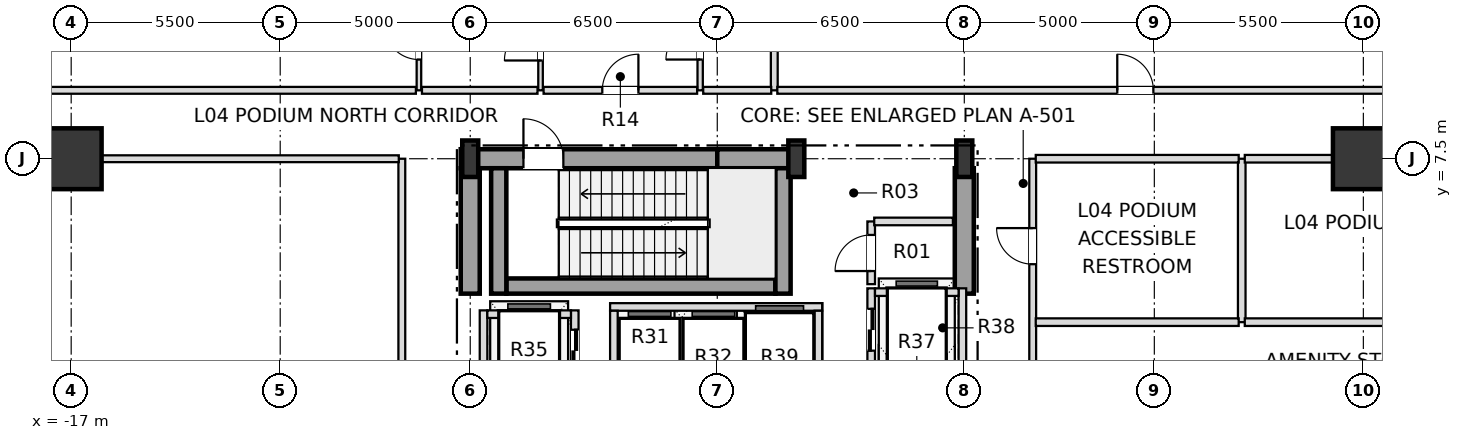
"""IFC4 building model, lengths in metres.
Left out: names, types, materials, properties, quantities, classifications, styles, units other than length and angle.
Written with IfcOpenShell. Run it as: python <this file> out.ifc"""

import sys

from ifc_helpers import new_model, si_unit, direction, frame, frame_2d, origin, origin_2d, place, context, subcontext, project, spatial, rectangle, i_section, extrude, element, fill, save


model = new_model("IFC4")
c1 = context("Model", 3, precision=1e-05, world=origin(), true_north=direction((0.0, 1.0)))
c2 = subcontext(c1, "Body", "Model", "MODEL_VIEW")
j1 = project(units=[si_unit("LENGTHUNIT", "METRE"), si_unit("PLANEANGLEUNIT", "RADIAN")], contexts=[c1])
p1 = place(None, origin())
s1 = spatial("IfcSite", under=j1, at=p1, CompositionType="ELEMENT")
p2 = place(p1, origin())
s2 = spatial("IfcBuilding", under=s1, at=p2, CompositionType="ELEMENT")
p3 = place(p2, frame((0.0, 0.0, 22.2)))
s3 = spatial("IfcBuildingStorey", under=s2, at=p3, CompositionType="ELEMENT", Elevation=22.2)
for number, where, z_axis, x_axis in (
    (1, (-6.5, 7.5, 0.0), (0.0, 0.0, 1.0), (1.0, 0.0, 0.0)),
    (2, (2.08, 7.5, 0.0), (0.0, 0.0, 1.0), (1.0, 0.0, 0.0)),
    (3, (6.5, 7.5, 0.0), (0.0, 0.0, 1.0), (1.0, 0.0, 0.0)),
):
    element("IfcColumn", number, at=place(p3, frame(where, z_axis=z_axis, x_axis=x_axis)), inside=s3, PredefinedType="COLUMN", context=c2, shape_type="SweptSolid", body=[
        extrude(i_section(OverallWidth=0.42, OverallDepth=0.96, WebThickness=0.022, FlangeThickness=0.034, at=origin_2d()), origin(), (0.0, 0.0, 1.0), 5.4),
    ])
for number, where, z_axis, x_axis in (
    (4, (17.0, 7.5, 0.0), (0.0, 0.0, 1.0), (1.0, 0.0, 0.0)),
    (5, (-17.0, 7.5, 0.0), (0.0, 0.0, 1.0), (1.0, 0.0, 0.0)),
):
    element("IfcColumn", number, at=place(p3, frame(where, z_axis=z_axis, x_axis=x_axis)), inside=s3, PredefinedType="USERDEFINED", context=c2, shape_type="SweptSolid", body=[
        extrude(rectangle(XDim=1.6, YDim=1.6, at=origin_2d()), origin(), (0.0, 0.0, 1.0), 5.4),
    ])
p4 = place(p3, frame((-6.75, 7.5, 0.0), z_axis=(0.0, 0.0, 1.0), x_axis=(1.0, 0.0, 0.0)))
e6 = element("IfcWall", 6, at=p4, inside=s3, PredefinedType="SHEAR", context=c2, shape_type="SweptSolid", body=[
    extrude(rectangle(XDim=6.75, YDim=0.5, at=frame_2d((3.375, 0.0))), origin(), (0.0, 0.0, 1.0), 5.0),
])
p5 = place(p4, frame((1.65, 0.0, 0.0)))
e7 = element("IfcOpeningElement", 7, at=p5, cuts=e6, PredefinedType="OPENING", context=c2, shape_type="SweptSolid", body=[
    extrude(rectangle(XDim=1.05, YDim=2.15, at=frame_2d((0.525, 1.075))), frame((0.0, 0.26, 0.0), z_axis=(0.0, -1.0, 0.0), x_axis=(1.0, 0.0, 0.0)), (0.0, 0.0, 1.0), 0.52),
])
p6 = place(p3, frame((0.0, 7.5, 0.0), z_axis=(0.0, 0.0, 1.0), x_axis=(1.0, 0.0, 0.0)))
e8 = element("IfcWall", 8, at=p6, inside=s3, PredefinedType="SHEAR", context=c2, shape_type="SweptSolid", body=[
    extrude(rectangle(XDim=2.08, YDim=0.5, at=frame_2d((1.04, 0.0))), origin(), (0.0, 0.0, 1.0), 5.0),
])
for number, where, z_axis, x_axis in (
    (9, (-6.5, 3.95, 0.0), (0.0, 0.0, 1.0), (0.0, 1.0, 0.0)),
    (10, (6.5, 3.95, 0.0), (0.0, 0.0, 1.0), (0.0, 1.0, 0.0)),
):
    element("IfcWall", number, at=place(p3, frame(where, z_axis=z_axis, x_axis=x_axis)), inside=s3, PredefinedType="SHEAR", context=c2, shape_type="SweptSolid", body=[
        extrude(rectangle(XDim=3.3, YDim=0.5, at=frame_2d((1.65, 0.0))), origin(), (0.0, 0.0, 1.0), 5.0),
    ])
p7 = place(p3, frame((-5.55, 4.15, 0.0), z_axis=(0.0, 0.0, 1.0), x_axis=(1.0, 0.0, 0.0)))
e11 = element("IfcWall", 11, at=p7, inside=s3, PredefinedType="SHEAR", context=c2, shape_type="SweptSolid", body=[
    extrude(rectangle(XDim=7.08, YDim=0.4, at=frame_2d((3.54, 0.0))), origin(), (0.0, 0.0, 1.0), 5.0),
])
for number, where, z_axis, x_axis in (
    (12, (1.73, 3.95, 0.0), (0.0, 0.0, 1.0), (0.0, 1.0, 0.0)),
    (13, (-5.75, 3.95, 0.0), (0.0, 0.0, 1.0), (0.0, 1.0, 0.0)),
):
    element("IfcWall", number, at=place(p3, frame(where, z_axis=z_axis, x_axis=x_axis)), inside=s3, PredefinedType="SHEAR", context=c2, shape_type="SweptSolid", body=[
        extrude(rectangle(XDim=3.3, YDim=0.4, at=frame_2d((1.65, 0.0))), origin(), (0.0, 0.0, 1.0), 5.0),
    ])
p8 = place(p3, frame((-3.75, -3.51, 0.0), z_axis=(0.0, 0.0, 1.0), x_axis=(0.0, 1.0, 0.0)))
e14 = element("IfcWall", 14, at=p8, inside=s3, PredefinedType="SOLIDWALL", context=c2, shape_type="SweptSolid", body=[
    extrude(rectangle(XDim=7.02, YDim=0.2, at=frame_2d((3.51, 0.0))), origin(), (0.0, 0.0, 1.0), 5.0),
])
p9 = place(p8, frame((0.51, 0.0, 0.0)))
e15 = element("IfcOpeningElement", 15, at=p9, cuts=e14, PredefinedType="OPENING", context=c2, shape_type="SweptSolid", body=[
    extrude(rectangle(XDim=1.1, YDim=2.15, at=frame_2d((0.55, 1.075))), frame((0.0, 0.11, 0.0), z_axis=(0.0, -1.0, 0.0), x_axis=(1.0, 0.0, 0.0)), (0.0, 0.0, 1.0), 0.22),
])
p10 = place(p8, frame((2.96, 0.0, 0.0)))
e16 = element("IfcOpeningElement", 16, at=p10, cuts=e14, PredefinedType="OPENING", context=c2, shape_type="SweptSolid", body=[
    extrude(rectangle(XDim=1.1, YDim=2.15, at=frame_2d((0.55, 1.075))), frame((0.0, 0.11, 0.0), z_axis=(0.0, -1.0, 0.0), x_axis=(1.0, 0.0, 0.0)), (0.0, 0.0, 1.0), 0.22),
])
p11 = place(p8, frame((5.41, 0.0, 0.0)))
e17 = element("IfcOpeningElement", 17, at=p11, cuts=e14, PredefinedType="OPENING", context=c2, shape_type="SweptSolid", body=[
    extrude(rectangle(XDim=1.1, YDim=2.15, at=frame_2d((0.55, 1.075))), frame((0.0, 0.11, 0.0), z_axis=(0.0, -1.0, 0.0), x_axis=(1.0, 0.0, 0.0)), (0.0, 0.0, 1.0), 0.22),
])
p12 = place(p3, frame((-6.15, -3.51, 0.0), z_axis=(0.0, 0.0, 1.0), x_axis=(0.0, 1.0, 0.0)))
e18 = element("IfcWall", 18, at=p12, inside=s3, PredefinedType="SOLIDWALL", context=c2, shape_type="SweptSolid", body=[
    extrude(rectangle(XDim=7.02, YDim=0.2, at=frame_2d((3.51, 0.0))), origin(), (0.0, 0.0, 1.0), 5.0),
])
p13 = place(p3, frame((-6.05, 3.41, 0.0), z_axis=(0.0, 0.0, 1.0), x_axis=(1.0, 0.0, 0.0)))
e19 = element("IfcWall", 19, at=p13, inside=s3, PredefinedType="SOLIDWALL", context=c2, shape_type="SweptSolid", body=[
    extrude(rectangle(XDim=2.2, YDim=0.2, at=frame_2d((1.1, 0.0))), origin(), (0.0, 0.0, 1.0), 5.0),
])
p14 = place(p3, frame((4.05, -1.49, 0.0), z_axis=(0.0, 0.0, 1.0), x_axis=(0.0, 1.0, 0.0)))
e20 = element("IfcWall", 20, at=p14, inside=s3, PredefinedType="SOLIDWALL", context=c2, shape_type="SweptSolid", body=[
    extrude(rectangle(XDim=5.58, YDim=0.2, at=frame_2d((2.79, 0.0))), origin(), (0.0, 0.0, 1.0), 5.0),
])
p15 = place(p14, frame((0.54, 0.0, 0.0)))
e21 = element("IfcOpeningElement", 21, at=p15, cuts=e20, PredefinedType="OPENING", context=c2, shape_type="SweptSolid", body=[
    extrude(rectangle(XDim=1.1, YDim=2.15, at=frame_2d((0.55, 1.075))), frame((0.0, 0.11, 0.0), z_axis=(0.0, -1.0, 0.0), x_axis=(1.0, 0.0, 0.0)), (0.0, 0.0, 1.0), 0.22),
])
p16 = place(p14, frame((2.24, 0.0, 0.0)))
e22 = element("IfcOpeningElement", 22, at=p16, cuts=e20, PredefinedType="OPENING", context=c2, shape_type="SweptSolid", body=[
    extrude(rectangle(XDim=1.1, YDim=2.15, at=frame_2d((0.55, 1.075))), frame((0.0, 0.11, 0.0), z_axis=(0.0, -1.0, 0.0), x_axis=(1.0, 0.0, 0.0)), (0.0, 0.0, 1.0), 0.22),
])
p17 = place(p14, frame((3.94, 0.0, 0.0)))
e23 = element("IfcOpeningElement", 23, at=p17, cuts=e20, PredefinedType="OPENING", context=c2, shape_type="SweptSolid", body=[
    extrude(rectangle(XDim=1.1, YDim=2.15, at=frame_2d((0.55, 1.075))), frame((0.0, 0.11, 0.0), z_axis=(0.0, -1.0, 0.0), x_axis=(1.0, 0.0, 0.0)), (0.0, 0.0, 1.0), 0.22),
])
p18 = place(p3, frame((6.45, -1.49, 0.0), z_axis=(0.0, 0.0, 1.0), x_axis=(0.0, 1.0, 0.0)))
e24 = element("IfcWall", 24, at=p18, inside=s3, PredefinedType="SOLIDWALL", context=c2, shape_type="SweptSolid", body=[
    extrude(rectangle(XDim=5.58, YDim=0.2, at=frame_2d((2.79, 0.0))), origin(), (0.0, 0.0, 1.0), 4.436),
])
p19 = place(p3, frame((4.15, 3.99, 0.0), z_axis=(0.0, 0.0, 1.0), x_axis=(1.0, 0.0, 0.0)))
e25 = element("IfcWall", 25, at=p19, inside=s3, PredefinedType="SOLIDWALL", context=c2, shape_type="SweptSolid", body=[
    extrude(rectangle(XDim=2.2, YDim=0.2, at=frame_2d((1.1, 0.0))), origin(), (0.0, 0.0, 1.0), 5.0),
])
p20 = place(p3, frame((-2.82, 3.6, 0.0), z_axis=(0.0, 0.0, 1.0), x_axis=(1.0, 0.0, 0.0)))
e26 = element("IfcWall", 26, at=p20, inside=s3, PredefinedType="SOLIDWALL", context=c2, shape_type="SweptSolid", body=[
    extrude(rectangle(XDim=5.58, YDim=0.2, at=frame_2d((2.79, 0.0))), origin(), (0.0, 0.0, 1.0), 5.0),
])
for number, where, z_axis, x_axis in (
    (27, (-2.72, 1.0, 0.0), (0.0, 0.0, 1.0), (0.0, 1.0, 0.0)),
    (28, (2.66, 1.0, 0.0), (0.0, 0.0, 1.0), (0.0, 1.0, 0.0)),
):
    element("IfcWall", number, at=place(p3, frame(where, z_axis=z_axis, x_axis=x_axis)), inside=s3, PredefinedType="SOLIDWALL", context=c2, shape_type="SweptSolid", body=[
        extrude(rectangle(XDim=2.5, YDim=0.2, at=frame_2d((1.25, 0.0))), origin(), (0.0, 0.0, 1.0), 5.0),
    ])
p21 = place(p3, frame((-8.3, -7.5, 0.0), z_axis=(0.0, 0.0, 1.0), x_axis=(0.0, 1.0, 0.0)))
e29 = element("IfcWall", 29, at=p21, inside=s3, PredefinedType="PARTITIONING", context=c2, shape_type="SweptSolid", body=[
    extrude(rectangle(XDim=15.0, YDim=0.18, at=frame_2d((7.5, 0.0))), origin(), (0.0, 0.0, 1.0), 5.0),
])
p22 = place(p21, frame((7.025, 0.0, 0.0)))
e30 = element("IfcOpeningElement", 30, at=p22, cuts=e29, PredefinedType="OPENING", context=c2, shape_type="SweptSolid", body=[
    extrude(rectangle(XDim=0.95, YDim=2.15, at=frame_2d((0.475, 1.075))), frame((0.0, 0.1, 0.0), z_axis=(0.0, -1.0, 0.0), x_axis=(1.0, 0.0, 0.0)), (0.0, 0.0, 1.0), 0.2),
])
p23 = place(p3, frame((-7.85, 9.3, 0.0), z_axis=(0.0, 0.0, 1.0), x_axis=(0.0, 1.0, 0.0)))
e31 = element("IfcWall", 31, at=p23, inside=s3, PredefinedType="PARTITIONING", context=c2, shape_type="SweptSolid", body=[
    extrude(rectangle(XDim=7.395, YDim=0.12, at=frame_2d((3.698, 0.0))), origin(), (0.0, 0.0, 1.0), 4.436),
])
p24 = place(p23, frame((0.81, 0.0, 0.0)))
e32 = element("IfcOpeningElement", 32, at=p24, cuts=e31, PredefinedType="OPENING", context=c2, shape_type="SweptSolid", body=[
    extrude(rectangle(XDim=0.9, YDim=2.1, at=frame_2d((0.45, 1.05))), frame((0.0, 0.07, 0.0), z_axis=(0.0, -1.0, 0.0), x_axis=(1.0, 0.0, 0.0)), (0.0, 0.0, 1.0), 0.14),
])
p25 = place(p23, frame((4.51, 0.0, 0.0)))
e33 = element("IfcOpeningElement", 33, at=p25, cuts=e31, PredefinedType="OPENING", context=c2, shape_type="SweptSolid", body=[
    extrude(rectangle(XDim=0.9, YDim=2.1, at=frame_2d((0.45, 1.05))), frame((0.0, 0.07, 0.0), z_axis=(0.0, -1.0, 0.0), x_axis=(1.0, 0.0, 0.0)), (0.0, 0.0, 1.0), 0.14),
])
p26 = place(p3, frame((-4.65, 9.3, 0.0), z_axis=(0.0, 0.0, 1.0), x_axis=(0.0, 1.0, 0.0)))
e34 = element("IfcWall", 34, at=p26, inside=s3, PredefinedType="PARTITIONING", context=c2, shape_type="SweptSolid", body=[
    extrude(rectangle(XDim=2.52, YDim=0.12, at=frame_2d((1.26, 0.0))), origin(), (0.0, 0.0, 1.0), 5.0),
])
p27 = place(p26, frame((0.785, 0.0, 0.0)))
e35 = element("IfcOpeningElement", 35, at=p27, cuts=e34, PredefinedType="OPENING", context=c2, shape_type="SweptSolid", body=[
    extrude(rectangle(XDim=0.95, YDim=2.1, at=frame_2d((0.475, 1.05))), frame((0.0, 0.07, 0.0), z_axis=(0.0, -1.0, 0.0), x_axis=(1.0, 0.0, 0.0)), (0.0, 0.0, 1.0), 0.14),
])
p28 = place(p3, frame((-0.45, 9.3, 0.0), z_axis=(0.0, 0.0, 1.0), x_axis=(0.0, 1.0, 0.0)))
e36 = element("IfcWall", 36, at=p28, inside=s3, PredefinedType="PARTITIONING", context=c2, shape_type="SweptSolid", body=[
    extrude(rectangle(XDim=2.52, YDim=0.14, at=frame_2d((1.26, 0.0))), origin(), (0.0, 0.0, 1.0), 5.0),
])
p29 = place(p28, frame((0.81, 0.0, 0.0)))
e37 = element("IfcOpeningElement", 37, at=p29, cuts=e36, PredefinedType="OPENING", context=c2, shape_type="SweptSolid", body=[
    extrude(rectangle(XDim=0.9, YDim=2.1, at=frame_2d((0.45, 1.05))), frame((0.0, 0.08, 0.0), z_axis=(0.0, -1.0, 0.0), x_axis=(1.0, 0.0, 0.0)), (0.0, 0.0, 1.0), 0.16),
])
p30 = place(p3, frame((1.5, 9.3, 0.0), z_axis=(0.0, 0.0, 1.0), x_axis=(0.0, 1.0, 0.0)))
e38 = element("IfcWall", 38, at=p30, inside=s3, PredefinedType="PARTITIONING", context=c2, shape_type="SweptSolid", body=[
    extrude(rectangle(XDim=7.455, YDim=0.18, at=frame_2d((3.728, 0.0))), origin(), (0.0, 0.0, 1.0), 4.568),
])
p31 = place(p3, frame((4.05, 4.2, 0.0), z_axis=(0.0, 0.0, 1.0), x_axis=(0.0, 1.0, 0.0)))
e39 = element("IfcWall", 39, at=p31, inside=s3, PredefinedType="SOLIDWALL", context=c2, shape_type="SweptSolid", body=[
    extrude(rectangle(XDim=1.65, YDim=0.2, at=frame_2d((0.825, 0.0))), origin(), (0.0, 0.0, 1.0), 5.0),
])
p32 = place(p31, frame((0.345, 0.0, 0.0)))
e40 = element("IfcOpeningElement", 40, at=p32, cuts=e39, PredefinedType="OPENING", context=c2, shape_type="SweptSolid", body=[
    extrude(rectangle(XDim=0.95, YDim=2.15, at=frame_2d((0.475, 1.075))), frame((0.0, 0.11, 0.0), z_axis=(0.0, -1.0, 0.0), x_axis=(1.0, 0.0, 0.0)), (0.0, 0.0, 1.0), 0.22),
])
p33 = place(p3, frame((8.3, -7.5, 0.0), z_axis=(0.0, 0.0, 1.0), x_axis=(0.0, 1.0, 0.0)))
e41 = element("IfcWall", 41, at=p33, inside=s3, PredefinedType="PARTITIONING", context=c2, shape_type="SweptSolid", body=[
    extrude(rectangle(XDim=15.0, YDim=0.18, at=frame_2d((7.5, 0.0))), origin(), (0.0, 0.0, 1.0), 5.0),
])
p34 = place(p33, frame((5.025, 0.0, 0.0)))
e42 = element("IfcOpeningElement", 42, at=p34, cuts=e41, PredefinedType="OPENING", context=c2, shape_type="SweptSolid", body=[
    extrude(rectangle(XDim=0.95, YDim=2.15, at=frame_2d((0.475, 1.075))), frame((0.0, 0.1, 0.0), z_axis=(0.0, -1.0, 0.0), x_axis=(1.0, 0.0, 0.0)), (0.0, 0.0, 1.0), 0.2),
])
p35 = place(p33, frame((12.225, 0.0, 0.0)))
e43 = element("IfcOpeningElement", 43, at=p35, cuts=e41, PredefinedType="OPENING", context=c2, shape_type="SweptSolid", body=[
    extrude(rectangle(XDim=0.95, YDim=2.15, at=frame_2d((0.475, 1.075))), frame((0.0, 0.1, 0.0), z_axis=(0.0, -1.0, 0.0), x_axis=(1.0, 0.0, 0.0)), (0.0, 0.0, 1.0), 0.2),
])
p36 = place(p3, frame((13.8, 3.2, 0.0), z_axis=(0.0, 0.0, 1.0), x_axis=(0.0, 1.0, 0.0)))
e44 = element("IfcWall", 44, at=p36, inside=s3, PredefinedType="SOLIDWALL", context=c2, shape_type="SweptSolid", body=[
    extrude(rectangle(XDim=4.3, YDim=0.2, at=frame_2d((2.15, 0.0))), origin(), (0.0, 0.0, 1.0), 5.0),
])
p37 = place(p3, frame((8.38, 3.2, 0.0), z_axis=(0.0, 0.0, 1.0), x_axis=(1.0, 0.0, 0.0)))
e45 = element("IfcWall", 45, at=p37, inside=s3, PredefinedType="SOLIDWALL", context=c2, shape_type="SweptSolid", body=[
    extrude(rectangle(XDim=5.34, YDim=0.2, at=frame_2d((2.67, 0.0))), origin(), (0.0, 0.0, 1.0), 4.568),
])
p38 = place(p3, frame((13.88, 3.2, 0.0), z_axis=(0.0, 0.0, 1.0), x_axis=(1.0, 0.0, 0.0)))
e46 = element("IfcWall", 46, at=p38, inside=s3, PredefinedType="SOLIDWALL", context=c2, shape_type="SweptSolid", body=[
    extrude(rectangle(XDim=8.815, YDim=0.2, at=frame_2d((4.408, 0.0))), origin(), (0.0, 0.0, 1.0), 4.356),
])
p39 = place(p38, frame((3.645, 0.0, 0.0)))
e47 = element("IfcOpeningElement", 47, at=p39, cuts=e46, PredefinedType="OPENING", context=c2, shape_type="SweptSolid", body=[
    extrude(rectangle(XDim=0.95, YDim=2.15, at=frame_2d((0.475, 1.075))), frame((0.0, 0.11, 0.0), z_axis=(0.0, -1.0, 0.0), x_axis=(1.0, 0.0, 0.0)), (0.0, 0.0, 1.0), 0.22),
])
p40 = place(p3, frame((4.13, 5.85, 0.0), z_axis=(0.0, 0.0, 1.0), x_axis=(1.0, 0.0, 0.0)))
e48 = element("IfcWall", 48, at=p40, inside=s3, PredefinedType="SOLIDWALL", context=c2, shape_type="SweptSolid", body=[
    extrude(rectangle(XDim=2.07, YDim=0.2, at=frame_2d((1.035, 0.0))), origin(), (0.0, 0.0, 1.0), 5.0),
])
p41 = place(p3, frame((-22.695, 7.5, 0.0), z_axis=(0.0, 0.0, 1.0), x_axis=(1.0, 0.0, 0.0)))
e49 = element("IfcWall", 49, at=p41, inside=s3, PredefinedType="PARTITIONING", context=c2, shape_type="SweptSolid", body=[
    extrude(rectangle(XDim=14.315, YDim=0.18, at=frame_2d((7.158, 0.0))), origin(), (0.0, 0.0, 1.0), 4.356),
])
p42 = place(p3, frame((8.38, 7.5, 0.0), z_axis=(0.0, 0.0, 1.0), x_axis=(1.0, 0.0, 0.0)))
e50 = element("IfcWall", 50, at=p42, inside=s3, PredefinedType="SOLIDWALL", context=c2, shape_type="SweptSolid", body=[
    extrude(rectangle(XDim=5.34, YDim=0.2, at=frame_2d((2.67, 0.0))), origin(), (0.0, 0.0, 1.0), 4.436),
])
p43 = place(p3, frame((13.88, 7.5, 0.0), z_axis=(0.0, 0.0, 1.0), x_axis=(1.0, 0.0, 0.0)))
e51 = element("IfcWall", 51, at=p43, inside=s3, PredefinedType="SOLIDWALL", context=c2, shape_type="SweptSolid", body=[
    extrude(rectangle(XDim=8.815, YDim=0.2, at=frame_2d((4.408, 0.0))), origin(), (0.0, 0.0, 1.0), 4.356),
])
p44 = place(p3, frame((-22.695, 9.3, 0.0), z_axis=(0.0, 0.0, 1.0), x_axis=(1.0, 0.0, 0.0)))
e52 = element("IfcWall", 52, at=p44, inside=s3, PredefinedType="PARTITIONING", context=c2, shape_type="SweptSolid", body=[
    extrude(rectangle(XDim=14.765, YDim=0.18, at=frame_2d((7.383, 0.0))), origin(), (0.0, 0.0, 1.0), 4.356),
])
p45 = place(p3, frame((-7.77, 9.3, 0.0), z_axis=(0.0, 0.0, 1.0), x_axis=(1.0, 0.0, 0.0)))
e53 = element("IfcWall", 53, at=p45, inside=s3, PredefinedType="PARTITIONING", context=c2, shape_type="SweptSolid", body=[
    extrude(rectangle(XDim=3.04, YDim=0.18, at=frame_2d((1.52, 0.0))), origin(), (0.0, 0.0, 1.0), 4.436),
])
p46 = place(p3, frame((-4.57, 9.3, 0.0), z_axis=(0.0, 0.0, 1.0), x_axis=(1.0, 0.0, 0.0)))
e54 = element("IfcWall", 54, at=p46, inside=s3, PredefinedType="PARTITIONING", context=c2, shape_type="SweptSolid", body=[
    extrude(rectangle(XDim=4.04, YDim=0.18, at=frame_2d((2.02, 0.0))), origin(), (0.0, 0.0, 1.0), 5.0),
])
p47 = place(p46, frame((1.545, 0.0, 0.0)))
e55 = element("IfcOpeningElement", 55, at=p47, cuts=e54, PredefinedType="OPENING", context=c2, shape_type="SweptSolid", body=[
    extrude(rectangle(XDim=0.95, YDim=2.15, at=frame_2d((0.475, 1.075))), frame((0.0, 0.1, 0.0), z_axis=(0.0, -1.0, 0.0), x_axis=(1.0, 0.0, 0.0)), (0.0, 0.0, 1.0), 0.2),
])
p48 = place(p3, frame((-0.37, 9.3, 0.0), z_axis=(0.0, 0.0, 1.0), x_axis=(1.0, 0.0, 0.0)))
e56 = element("IfcWall", 56, at=p48, inside=s3, PredefinedType="PARTITIONING", context=c2, shape_type="SweptSolid", body=[
    extrude(rectangle(XDim=1.79, YDim=0.18, at=frame_2d((0.895, 0.0))), origin(), (0.0, 0.0, 1.0), 5.0),
])
p49 = place(p3, frame((1.58, 9.3, 0.0), z_axis=(0.0, 0.0, 1.0), x_axis=(1.0, 0.0, 0.0)))
e57 = element("IfcWall", 57, at=p49, inside=s3, PredefinedType="PARTITIONING", context=c2, shape_type="SweptSolid", body=[
    extrude(rectangle(XDim=21.115, YDim=0.18, at=frame_2d((10.558, 0.0))), origin(), (0.0, 0.0, 1.0), 4.356),
])
p50 = place(p49, frame((8.945, 0.0, 0.0)))
e58 = element("IfcOpeningElement", 58, at=p50, cuts=e57, PredefinedType="OPENING", context=c2, shape_type="SweptSolid", body=[
    extrude(rectangle(XDim=0.95, YDim=2.15, at=frame_2d((0.475, 1.075))), frame((0.0, 0.1, 0.0), z_axis=(0.0, -1.0, 0.0), x_axis=(1.0, 0.0, 0.0)), (0.0, 0.0, 1.0), 0.2),
])
p51 = place(p5, origin())
e59 = element("IfcDoor", 59, at=p51, inside=s3, OperationType="SINGLE_SWING_LEFT", PredefinedType="DOOR", context=c2, shape_type="SweptSolid", body=[
    extrude(rectangle(XDim=1.05, YDim=2.15, at=frame_2d((0.525, 1.075))), frame((0.0, 0.025, 0.0), z_axis=(0.0, -1.0, 0.0), x_axis=(1.0, 0.0, 0.0)), (0.0, 0.0, 1.0), 0.05),
])
fill(e7, e59)
p52 = place(p11, origin())
e60 = element("IfcDoor", 60, at=p52, inside=s3, OperationType="DOUBLE_DOOR_SLIDING", PredefinedType="DOOR", context=c2, shape_type="SweptSolid", body=[
    extrude(rectangle(XDim=1.1, YDim=2.15, at=frame_2d((0.55, 1.075))), frame((0.0, 0.025, 0.0), z_axis=(0.0, -1.0, 0.0), x_axis=(1.0, 0.0, 0.0)), (0.0, 0.0, 1.0), 0.05),
])
fill(e17, e60)
p53 = place(p17, origin())
e61 = element("IfcDoor", 61, at=p53, inside=s3, OperationType="DOUBLE_DOOR_SLIDING", PredefinedType="DOOR", context=c2, shape_type="SweptSolid", body=[
    extrude(rectangle(XDim=1.1, YDim=2.15, at=frame_2d((0.55, 1.075))), frame((0.0, 0.025, 0.0), z_axis=(0.0, -1.0, 0.0), x_axis=(1.0, 0.0, 0.0)), (0.0, 0.0, 1.0), 0.05),
])
fill(e23, e61)
p54 = place(p32, origin())
e62 = element("IfcDoor", 62, at=p54, inside=s3, OperationType="SINGLE_SWING_LEFT", PredefinedType="DOOR", context=c2, shape_type="SweptSolid", body=[
    extrude(rectangle(XDim=0.95, YDim=2.15, at=frame_2d((0.475, 1.075))), frame((0.0, 0.025, 0.0), z_axis=(0.0, -1.0, 0.0), x_axis=(1.0, 0.0, 0.0)), (0.0, 0.0, 1.0), 0.05),
])
fill(e40, e62)
p55 = place(p29, origin())
e63 = element("IfcDoor", 63, at=p55, inside=s3, OperationType="SINGLE_SWING_LEFT", PredefinedType="DOOR", context=c2, shape_type="SweptSolid", body=[
    extrude(rectangle(XDim=0.9, YDim=2.1, at=frame_2d((0.45, 1.05))), frame((0.0, 0.025, 0.0), z_axis=(0.0, -1.0, 0.0), x_axis=(1.0, 0.0, 0.0)), (0.0, 0.0, 1.0), 0.05),
])
fill(e37, e63)
p56 = place(p47, origin())
e64 = element("IfcDoor", 64, at=p56, inside=s3, OperationType="SINGLE_SWING_RIGHT", PredefinedType="DOOR", context=c2, shape_type="SweptSolid", body=[
    extrude(rectangle(XDim=0.95, YDim=2.15, at=frame_2d((0.475, 1.075))), frame((0.0, 0.025, 0.0), z_axis=(0.0, -1.0, 0.0), x_axis=(1.0, 0.0, 0.0)), (0.0, 0.0, 1.0), 0.05),
])
fill(e55, e64)
p57 = place(p27, origin())
e65 = element("IfcDoor", 65, at=p57, inside=s3, OperationType="SINGLE_SWING_LEFT", PredefinedType="DOOR", context=c2, shape_type="SweptSolid", body=[
    extrude(rectangle(XDim=0.95, YDim=2.1, at=frame_2d((0.475, 1.05))), frame((0.0, 0.025, 0.0), z_axis=(0.0, -1.0, 0.0), x_axis=(1.0, 0.0, 0.0)), (0.0, 0.0, 1.0), 0.05),
])
fill(e35, e65)
p58 = place(p24, origin())
e66 = element("IfcDoor", 66, at=p58, inside=s3, OperationType="SINGLE_SWING_RIGHT", PredefinedType="DOOR", context=c2, shape_type="SweptSolid", body=[
    extrude(rectangle(XDim=0.9, YDim=2.1, at=frame_2d((0.45, 1.05))), frame((0.0, 0.025, 0.0), z_axis=(0.0, -1.0, 0.0), x_axis=(1.0, 0.0, 0.0)), (0.0, 0.0, 1.0), 0.05),
])
fill(e32, e66)
p59 = place(p50, origin())
e67 = element("IfcDoor", 67, at=p59, inside=s3, OperationType="SINGLE_SWING_LEFT", PredefinedType="DOOR", context=c2, shape_type="SweptSolid", body=[
    extrude(rectangle(XDim=0.95, YDim=2.15, at=frame_2d((0.475, 1.075))), frame((0.0, 0.025, 0.0), z_axis=(0.0, -1.0, 0.0), x_axis=(1.0, 0.0, 0.0)), (0.0, 0.0, 1.0), 0.05),
])
fill(e58, e67)
p60 = place(p35, origin())
e68 = element("IfcDoor", 68, at=p60, inside=s3, OperationType="SINGLE_SWING_RIGHT", PredefinedType="DOOR", context=c2, shape_type="SweptSolid", body=[
    extrude(rectangle(XDim=0.95, YDim=2.15, at=frame_2d((0.475, 1.075))), frame((0.0, 0.025, 0.0), z_axis=(0.0, -1.0, 0.0), x_axis=(1.0, 0.0, 0.0)), (0.0, 0.0, 1.0), 0.05),
])
fill(e43, e68)
save(model, sys.argv[1])
